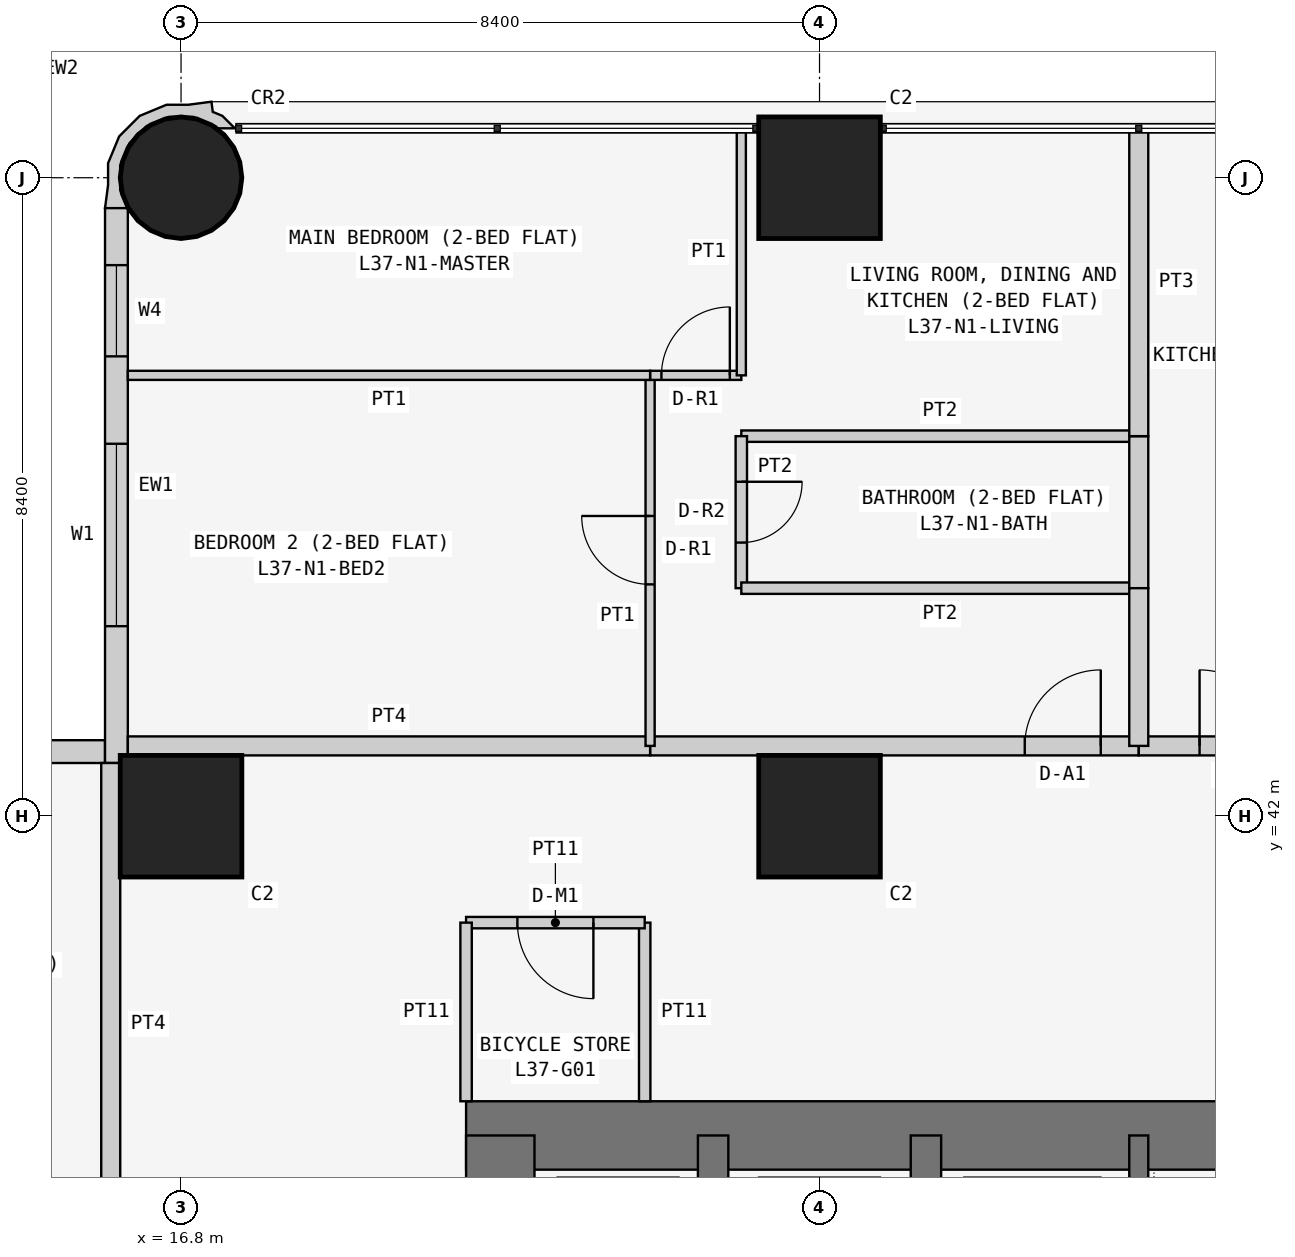
"""IFC4 building model, lengths in metres.
Left out: names, types, materials, properties, quantities, classifications, styles, units other than length and angle.
Written with IfcOpenShell. Run it as: python <this file> out.ifc"""

import sys

from ifc_helpers import new_model, si_unit, direction, frame, frame_2d, origin, origin_2d, place, context, subcontext, project, spatial, polyline, rectangle, circle, outline, extrude, element, fill, save


model = new_model("IFC4")
c1 = context("Model", 3, precision=1e-05, world=origin(), true_north=direction((0.0, 1.0)))
c2 = subcontext(c1, "Body", "Model", "MODEL_VIEW")
j1 = project(units=[si_unit("LENGTHUNIT", "METRE"), si_unit("PLANEANGLEUNIT", "RADIAN")], contexts=[c1])
p1 = place(None, origin())
s1 = spatial("IfcSite", under=j1, at=p1, CompositionType="ELEMENT")
p2 = place(p1, origin())
s2 = spatial("IfcBuilding", under=s1, at=p2, CompositionType="ELEMENT")
p3 = place(p2, frame((0.0, 0.0, 144.9)))
s3 = spatial("IfcBuildingStorey", under=s2, at=p3, CompositionType="ELEMENT", Elevation=144.9)
p4 = place(p3, frame((16.8, 42.0, 0.0), z_axis=(0.0, 0.0, 1.0), x_axis=(1.0, 0.0, 0.0)))
e1 = element("IfcColumn", 1, at=p4, inside=s3, PredefinedType="COLUMN", context=c2, shape_type="SweptSolid", body=[
    extrude(rectangle(XDim=1.6, YDim=1.6, at=origin_2d()), origin(), (0.0, 0.0, 1.0), 3.6),
])
p5 = place(p3, frame((16.8, 50.4, 0.0), z_axis=(0.0, 0.0, 1.0), x_axis=(1.0, 0.0, 0.0)))
e2 = element("IfcColumn", 2, at=p5, inside=s3, PredefinedType="COLUMN", context=c2, shape_type="SweptSolid", body=[
    extrude(circle(Radius=0.8, at=origin_2d()), origin(), (0.0, 0.0, 1.0), 3.6),
])
for number, where, z_axis, x_axis in (
    (3, (25.2, 42.0, 0.0), (0.0, 0.0, 1.0), (1.0, 0.0, 0.0)),
    (4, (25.2, 50.4, 0.0), (0.0, 0.0, 1.0), (1.0, 0.0, 0.0)),
):
    element("IfcColumn", number, at=place(p3, frame(where, z_axis=z_axis, x_axis=x_axis)), inside=s3, PredefinedType="COLUMN", context=c2, shape_type="SweptSolid", body=[
        extrude(rectangle(XDim=1.6, YDim=1.6, at=origin_2d()), origin(), (0.0, 0.0, 1.0), 3.6),
    ])
p6 = place(p3, frame((37.8, 37.8, 0.0), z_axis=(0.0, 0.0, 1.0), x_axis=(-1.0, 0.0, 0.0)))
e5 = element("IfcWall", 5, at=p6, inside=s3, PredefinedType="SHEAR", context=c2, shape_type="SweptSolid", body=[
    extrude(rectangle(XDim=17.25, YDim=0.9, at=frame_2d((8.625, 0.0))), origin(), (0.0, 0.0, 1.0), 3.6),
])
p7 = place(p3, frame((21.0, 37.8, 0.0), z_axis=(0.0, 0.0, 1.0), x_axis=(0.0, -1.0, 0.0)))
e6 = element("IfcWall", 6, at=p7, inside=s3, PredefinedType="SHEAR", context=c2, shape_type="SweptSolid", body=[
    extrude(rectangle(XDim=17.25, YDim=0.9, at=frame_2d((8.625, 0.0))), origin(), (0.0, 0.0, 1.0), 3.6),
])
p8 = place(p7, frame((5.4, 0.0, 0.0)))
e7 = element("IfcOpeningElement", 7, at=p8, cuts=e6, PredefinedType="OPENING", context=c2, shape_type="SweptSolid", body=[
    extrude(rectangle(XDim=1.2, YDim=2.1, at=frame_2d((0.6, 1.05))), frame((0.0, 0.46, 0.0), z_axis=(0.0, -1.0, 0.0), x_axis=(1.0, 0.0, 0.0)), (0.0, 0.0, 1.0), 0.92),
])
p9 = place(p3, frame((26.6, 21.0, 0.0), z_axis=(0.0, 0.0, 1.0), x_axis=(0.0, 1.0, 0.0)))
e8 = element("IfcWall", 8, at=p9, inside=s3, PredefinedType="SHEAR", context=c2, shape_type="SweptSolid", body=[
    extrude(rectangle(XDim=16.8, YDim=0.4, at=frame_2d((8.4, 0.0))), origin(), (0.0, 0.0, 1.0), 3.6),
])
p10 = place(p9, frame((10.4, 0.0, 0.0)))
e9 = element("IfcOpeningElement", 9, at=p10, cuts=e8, PredefinedType="OPENING", context=c2, shape_type="SweptSolid", body=[
    extrude(rectangle(XDim=1.2, YDim=2.1, at=frame_2d((0.6, 1.05))), frame((0.0, 0.21, 0.0), z_axis=(0.0, -1.0, 0.0), x_axis=(1.0, 0.0, 0.0)), (0.0, 0.0, 1.0), 0.42),
])
p11 = place(p3, frame((23.8, 34.6, 0.0), z_axis=(0.0, 0.0, 1.0), x_axis=(0.0, 1.0, 0.0)))
e10 = element("IfcWall", 10, at=p11, inside=s3, PredefinedType="SHEAR", context=c2, shape_type="SweptSolid", body=[
    extrude(rectangle(XDim=3.2, YDim=0.4, at=frame_2d((1.6, 0.0))), origin(), (0.0, 0.0, 1.0), 3.6),
])
p12 = place(p3, frame((29.4, 34.6, 0.0), z_axis=(0.0, 0.0, 1.0), x_axis=(0.0, 1.0, 0.0)))
e11 = element("IfcWall", 11, at=p12, inside=s3, PredefinedType="SHEAR", context=c2, shape_type="SweptSolid", body=[
    extrude(rectangle(XDim=3.2, YDim=0.25, at=frame_2d((1.6, 0.0))), origin(), (0.0, 0.0, 1.0), 3.6),
])
p13 = place(p3, frame((15.8, 42.85, 0.0), z_axis=(0.0, 0.0, 1.0), x_axis=(-1.0, 0.0, 0.0)))
e12 = element("IfcWall", 12, at=p13, inside=s3, PredefinedType="SOLIDWALL", context=c2, shape_type="SweptSolid", body=[
    extrude(rectangle(XDim=15.4, YDim=0.3, at=frame_2d((7.7, 0.0))), origin(), (0.0, 0.0, 1.0), 3.45),
])
p14 = place(p13, frame((1.2, 0.0, 0.9)))
e13 = element("IfcOpeningElement", 13, at=p14, cuts=e12, PredefinedType="OPENING", context=c2, shape_type="SweptSolid", body=[
    extrude(rectangle(XDim=1.8, YDim=1.5, at=frame_2d((0.9, 0.75))), frame((0.0, 0.16, 0.0), z_axis=(0.0, -1.0, 0.0), x_axis=(1.0, 0.0, 0.0)), (0.0, 0.0, 1.0), 0.32),
])
p15 = place(p13, frame((4.95, 0.0, 1.5)))
e14 = element("IfcOpeningElement", 14, at=p15, cuts=e12, PredefinedType="OPENING", context=c2, shape_type="SweptSolid", body=[
    extrude(rectangle(XDim=0.9, YDim=0.7, at=frame_2d((0.45, 0.35))), frame((0.0, 0.16, 0.0), z_axis=(0.0, -1.0, 0.0), x_axis=(1.0, 0.0, 0.0)), (0.0, 0.0, 1.0), 0.32),
])
p16 = place(p13, frame((8.5, 0.0, 0.9)))
e15 = element("IfcOpeningElement", 15, at=p16, cuts=e12, PredefinedType="OPENING", context=c2, shape_type="SweptSolid", body=[
    extrude(rectangle(XDim=1.8, YDim=1.5, at=frame_2d((0.9, 0.75))), frame((0.0, 0.16, 0.0), z_axis=(0.0, -1.0, 0.0), x_axis=(1.0, 0.0, 0.0)), (0.0, 0.0, 1.0), 0.32),
])
p17 = place(p13, frame((12.5, 0.0, 0.0)))
e16 = element("IfcOpeningElement", 16, at=p17, cuts=e12, PredefinedType="OPENING", context=c2, shape_type="SweptSolid", body=[
    extrude(rectangle(XDim=0.9, YDim=2.4, at=frame_2d((0.45, 1.2))), frame((0.0, 0.16, 0.0), z_axis=(0.0, -1.0, 0.0), x_axis=(1.0, 0.0, 0.0)), (0.0, 0.0, 1.0), 0.32),
])
p18 = place(p13, frame((13.5, 0.0, 0.9)))
e17 = element("IfcOpeningElement", 17, at=p18, cuts=e12, PredefinedType="OPENING", context=c2, shape_type="SweptSolid", body=[
    extrude(rectangle(XDim=1.2, YDim=1.5, at=frame_2d((0.6, 0.75))), frame((0.0, 0.16, 0.0), z_axis=(0.0, -1.0, 0.0), x_axis=(1.0, 0.0, 0.0)), (0.0, 0.0, 1.0), 0.32),
])
p19 = place(p3, frame((15.95, 50.0, 0.0), z_axis=(0.0, 0.0, 1.0), x_axis=(0.0, -1.0, 0.0)))
e18 = element("IfcWall", 18, at=p19, inside=s3, PredefinedType="SOLIDWALL", context=c2, shape_type="SweptSolid", body=[
    extrude(rectangle(XDim=7.3, YDim=0.3, at=frame_2d((3.65, 0.0))), origin(), (0.0, 0.0, 1.0), 3.45),
])
p20 = place(p19, frame((3.1, 0.0, 0.9)))
e19 = element("IfcOpeningElement", 19, at=p20, cuts=e18, PredefinedType="OPENING", context=c2, shape_type="SweptSolid", body=[
    extrude(rectangle(XDim=2.4, YDim=1.5, at=frame_2d((1.2, 0.75))), frame((0.0, 0.16, 0.0), z_axis=(0.0, -1.0, 0.0), x_axis=(1.0, 0.0, 0.0)), (0.0, 0.0, 1.0), 0.32),
])
p21 = place(p19, frame((0.75, 0.0, 0.9)))
e20 = element("IfcOpeningElement", 20, at=p21, cuts=e18, PredefinedType="OPENING", context=c2, shape_type="SweptSolid", body=[
    extrude(rectangle(XDim=1.2, YDim=1.5, at=frame_2d((0.6, 0.75))), frame((0.0, 0.16, 0.0), z_axis=(0.0, -1.0, 0.0), x_axis=(1.0, 0.0, 0.0)), (0.0, 0.0, 1.0), 0.32),
])
p22 = place(p3, frame((17.448, 50.995, 0.0), z_axis=(0.0, 0.0, 1.0), x_axis=(-0.343276641956, 0.93923434088, 0.0)))
e21 = element("IfcWall", 21, at=p22, inside=s3, PredefinedType="SOLIDWALL", context=c2, shape_type="SweptSolid", body=[
    extrude(outline(polyline([(0.241, 0.023), (0.333, 0.124), (0.465, 0.094), (0.532, 0.393), (0.631, 0.663), (0.614, 1.045), (0.454, 1.391), (0.172, 1.649), (-0.098, 1.748), (-0.369, 1.89), (-0.509, 1.621), (-0.491, 1.615), (-0.479, 1.609), (-0.211, 1.62), (0.088, 1.511), (0.323, 1.295), (0.457, 1.006), (0.47, 0.688), (0.361, 0.389), (0.145, 0.154), (0.108, 0.137), (0.031, -0.075), (0.241, 0.023)])), origin(), (0.0, 0.0, 1.0), 3.45),
])
p23 = place(p3, frame((22.9, 38.25, 0.0), z_axis=(0.0, 0.0, 1.0), x_axis=(0.0, 1.0, 0.0)))
e22 = element("IfcWall", 22, at=p23, inside=s3, PredefinedType="PARTITIONING", context=c2, shape_type="SweptSolid", body=[
    extrude(rectangle(XDim=2.35, YDim=0.15, at=frame_2d((1.175, 0.0))), origin(), (0.0, 0.0, 1.0), 3.45),
])
p24 = place(p3, frame((22.9, 40.6, 0.0), z_axis=(0.0, 0.0, 1.0), x_axis=(-1.0, 0.0, 0.0)))
e23 = element("IfcWall", 23, at=p24, inside=s3, PredefinedType="PARTITIONING", context=c2, shape_type="SweptSolid", body=[
    extrude(rectangle(XDim=2.35, YDim=0.15, at=frame_2d((1.175, 0.0))), origin(), (0.0, 0.0, 1.0), 3.45),
])
p25 = place(p24, frame((0.675, 0.0, 0.0)))
e24 = element("IfcOpeningElement", 24, at=p25, cuts=e23, PredefinedType="OPENING", context=c2, shape_type="SweptSolid", body=[
    extrude(rectangle(XDim=1.0, YDim=2.1, at=frame_2d((0.5, 1.05))), frame((0.0, 0.085, 0.0), z_axis=(0.0, -1.0, 0.0), x_axis=(1.0, 0.0, 0.0)), (0.0, 0.0, 1.0), 0.17),
])
p26 = place(p3, frame((20.55, 40.6, 0.0), z_axis=(0.0, 0.0, 1.0), x_axis=(0.0, -1.0, 0.0)))
e25 = element("IfcWall", 25, at=p26, inside=s3, PredefinedType="PARTITIONING", context=c2, shape_type="SweptSolid", body=[
    extrude(rectangle(XDim=2.35, YDim=0.15, at=frame_2d((1.175, 0.0))), origin(), (0.0, 0.0, 1.0), 3.45),
])
p27 = place(p3, frame((22.971, 42.925, 0.0), z_axis=(0.0, 0.0, 1.0), x_axis=(1.0, 0.0, 0.0)))
e26 = element("IfcWall", 26, at=p27, inside=s3, PredefinedType="PARTITIONING", context=c2, shape_type="SweptSolid", body=[
    extrude(rectangle(XDim=6.429, YDim=0.25, at=frame_2d((3.214, 0.0))), origin(), (0.0, 0.0, 1.0), 3.45),
])
p28 = place(p27, frame((4.929, 0.0, 0.0)))
e27 = element("IfcOpeningElement", 27, at=p28, cuts=e26, PredefinedType="OPENING", context=c2, shape_type="SweptSolid", body=[
    extrude(rectangle(XDim=1.0, YDim=2.1, at=frame_2d((0.5, 1.05))), frame((0.0, 0.135, 0.0), z_axis=(0.0, -1.0, 0.0), x_axis=(1.0, 0.0, 0.0)), (0.0, 0.0, 1.0), 0.27),
])
p29 = place(p3, frame((16.1, 42.925, 0.0), z_axis=(0.0, 0.0, 1.0), x_axis=(1.0, 0.0, 0.0)))
e28 = element("IfcWall", 28, at=p29, inside=s3, PredefinedType="PARTITIONING", context=c2, shape_type="SweptSolid", body=[
    extrude(rectangle(XDim=6.871, YDim=0.25, at=frame_2d((3.436, 0.0))), origin(), (0.0, 0.0, 1.0), 3.45),
])
p30 = place(p3, frame((29.4, 42.925, 0.0), z_axis=(0.0, 0.0, 1.0), x_axis=(1.0, 0.0, 0.0)))
e29 = element("IfcWall", 29, at=p30, inside=s3, PredefinedType="PARTITIONING", context=c2, shape_type="SweptSolid", body=[
    extrude(rectangle(XDim=2.6, YDim=0.25, at=frame_2d((1.3, 0.0))), origin(), (0.0, 0.0, 1.0), 3.45),
])
p31 = place(p30, frame((0.8, 0.0, 0.0)))
e30 = element("IfcOpeningElement", 30, at=p31, cuts=e29, PredefinedType="OPENING", context=c2, shape_type="SweptSolid", body=[
    extrude(rectangle(XDim=1.0, YDim=2.1, at=frame_2d((0.5, 1.05))), frame((0.0, 0.135, 0.0), z_axis=(0.0, -1.0, 0.0), x_axis=(1.0, 0.0, 0.0)), (0.0, 0.0, 1.0), 0.27),
])
p32 = place(p3, frame((15.875, 35.829, 0.0), z_axis=(0.0, 0.0, 1.0), x_axis=(0.0, 1.0, 0.0)))
e31 = element("IfcWall", 31, at=p32, inside=s3, PredefinedType="PARTITIONING", context=c2, shape_type="SweptSolid", body=[
    extrude(rectangle(XDim=6.871, YDim=0.25, at=frame_2d((3.436, 0.0))), origin(), (0.0, 0.0, 1.0), 3.45),
])
p33 = place(p3, frame((29.4, 47.0, 0.0), z_axis=(0.0, 0.0, 1.0), x_axis=(-1.0, 0.0, 0.0)))
e32 = element("IfcWall", 32, at=p33, inside=s3, PredefinedType="PARTITIONING", context=c2, shape_type="SweptSolid", body=[
    extrude(rectangle(XDim=5.229, YDim=0.15, at=frame_2d((2.615, 0.0))), origin(), (0.0, 0.0, 1.0), 3.45),
])
p34 = place(p3, frame((24.171, 47.0, 0.0), z_axis=(0.0, 0.0, 1.0), x_axis=(0.0, -1.0, 0.0)))
e33 = element("IfcWall", 33, at=p34, inside=s3, PredefinedType="PARTITIONING", context=c2, shape_type="SweptSolid", body=[
    extrude(rectangle(XDim=2.0, YDim=0.15, at=frame_2d((1.0, 0.0))), origin(), (0.0, 0.0, 1.0), 3.45),
])
p35 = place(p34, frame((0.6, 0.0, 0.0)))
e34 = element("IfcOpeningElement", 34, at=p35, cuts=e33, PredefinedType="OPENING", context=c2, shape_type="SweptSolid", body=[
    extrude(rectangle(XDim=0.8, YDim=2.1, at=frame_2d((0.4, 1.05))), frame((0.0, 0.085, 0.0), z_axis=(0.0, -1.0, 0.0), x_axis=(1.0, 0.0, 0.0)), (0.0, 0.0, 1.0), 0.17),
])
p36 = place(p3, frame((24.171, 45.0, 0.0), z_axis=(0.0, 0.0, 1.0), x_axis=(1.0, 0.0, 0.0)))
e35 = element("IfcWall", 35, at=p36, inside=s3, PredefinedType="PARTITIONING", context=c2, shape_type="SweptSolid", body=[
    extrude(rectangle(XDim=5.229, YDim=0.15, at=frame_2d((2.615, 0.0))), origin(), (0.0, 0.0, 1.0), 3.45),
])
p37 = place(p3, frame((29.4, 45.0, 0.0), z_axis=(0.0, 0.0, 1.0), x_axis=(0.0, 1.0, 0.0)))
e36 = element("IfcWall", 36, at=p37, inside=s3, PredefinedType="PARTITIONING", context=c2, shape_type="SweptSolid", body=[
    extrude(rectangle(XDim=2.0, YDim=0.25, at=frame_2d((1.0, 0.0))), origin(), (0.0, 0.0, 1.0), 2.848),
])
p38 = place(p3, frame((22.971, 42.925, 0.0), z_axis=(0.0, 0.0, 1.0), x_axis=(0.0, 1.0, 0.0)))
e37 = element("IfcWall", 37, at=p38, inside=s3, PredefinedType="PARTITIONING", context=c2, shape_type="SweptSolid", body=[
    extrude(rectangle(XDim=4.875, YDim=0.12, at=frame_2d((2.438, 0.0))), origin(), (0.0, 0.0, 1.0), 3.45),
])
p39 = place(p38, frame((2.125, 0.0, 0.0)))
e38 = element("IfcOpeningElement", 38, at=p39, cuts=e37, PredefinedType="OPENING", context=c2, shape_type="SweptSolid", body=[
    extrude(rectangle(XDim=0.9, YDim=2.1, at=frame_2d((0.45, 1.05))), frame((0.0, 0.07, 0.0), z_axis=(0.0, -1.0, 0.0), x_axis=(1.0, 0.0, 0.0)), (0.0, 0.0, 1.0), 0.14),
])
p40 = place(p3, frame((22.971, 47.8, 0.0), z_axis=(0.0, 0.0, 1.0), x_axis=(1.0, 0.0, 0.0)))
e39 = element("IfcWall", 39, at=p40, inside=s3, PredefinedType="PARTITIONING", context=c2, shape_type="SweptSolid", body=[
    extrude(rectangle(XDim=1.2, YDim=0.12, at=frame_2d((0.6, 0.0))), origin(), (0.0, 0.0, 1.0), 3.45),
])
p41 = place(p40, frame((0.149, 0.0, 0.0)))
e40 = element("IfcOpeningElement", 40, at=p41, cuts=e39, PredefinedType="OPENING", context=c2, shape_type="SweptSolid", body=[
    extrude(rectangle(XDim=0.9, YDim=2.1, at=frame_2d((0.45, 1.05))), frame((0.0, 0.07, 0.0), z_axis=(0.0, -1.0, 0.0), x_axis=(1.0, 0.0, 0.0)), (0.0, 0.0, 1.0), 0.14),
])
p42 = place(p3, frame((24.171, 47.8, 0.0), z_axis=(0.0, 0.0, 1.0), x_axis=(0.0, 1.0, 0.0)))
e41 = element("IfcWall", 41, at=p42, inside=s3, PredefinedType="PARTITIONING", context=c2, shape_type="SweptSolid", body=[
    extrude(rectangle(XDim=3.25, YDim=0.12, at=frame_2d((1.625, 0.0))), origin(), (0.0, 0.0, 1.0), 3.45),
])
p43 = place(p3, frame((29.4, 45.0, 0.0), z_axis=(0.0, 0.0, 1.0), x_axis=(0.0, -1.0, 0.0)))
e42 = element("IfcWall", 42, at=p43, inside=s3, PredefinedType="PARTITIONING", context=c2, shape_type="SweptSolid", body=[
    extrude(rectangle(XDim=2.075, YDim=0.25, at=frame_2d((1.038, 0.0))), origin(), (0.0, 0.0, 1.0), 2.848),
])
p44 = place(p3, frame((29.4, 51.05, 0.0), z_axis=(0.0, 0.0, 1.0), x_axis=(0.0, -1.0, 0.0)))
e43 = element("IfcWall", 43, at=p44, inside=s3, PredefinedType="PARTITIONING", context=c2, shape_type="SweptSolid", body=[
    extrude(rectangle(XDim=4.05, YDim=0.25, at=frame_2d((2.025, 0.0))), origin(), (0.0, 0.0, 1.0), 2.848),
])
p45 = place(p3, frame((22.971, 47.8, 0.0), z_axis=(0.0, 0.0, 1.0), x_axis=(-1.0, 0.0, 0.0)))
e44 = element("IfcWall", 44, at=p45, inside=s3, PredefinedType="PARTITIONING", context=c2, shape_type="SweptSolid", body=[
    extrude(rectangle(XDim=6.871, YDim=0.12, at=frame_2d((3.436, 0.0))), origin(), (0.0, 0.0, 1.0), 3.45),
])
p46 = place(p20, origin())
e45 = element("IfcWindow", 45, at=p46, inside=s3, PartitioningType="SINGLE_PANEL", PredefinedType="WINDOW", context=c2, shape_type="SweptSolid", body=[
    extrude(rectangle(XDim=2.4, YDim=1.5, at=frame_2d((1.2, 0.75))), frame((0.0, 0.03, 0.0), z_axis=(0.0, -1.0, 0.0), x_axis=(1.0, 0.0, 0.0)), (0.0, 0.0, 1.0), 0.06),
])
fill(e19, e45)
p47 = place(p21, origin())
e46 = element("IfcWindow", 46, at=p47, inside=s3, PartitioningType="SINGLE_PANEL", PredefinedType="WINDOW", context=c2, shape_type="SweptSolid", body=[
    extrude(rectangle(XDim=1.2, YDim=1.5, at=frame_2d((0.6, 0.75))), frame((0.0, 0.03, 0.0), z_axis=(0.0, -1.0, 0.0), x_axis=(1.0, 0.0, 0.0)), (0.0, 0.0, 1.0), 0.06),
])
fill(e20, e46)
p48 = place(p25, origin())
e47 = element("IfcDoor", 47, at=p48, inside=s3, OperationType="SINGLE_SWING_LEFT", PredefinedType="DOOR", context=c2, shape_type="SweptSolid", body=[
    extrude(rectangle(XDim=1.0, YDim=2.1, at=frame_2d((0.5, 1.05))), frame((0.0, 0.025, 0.0), z_axis=(0.0, -1.0, 0.0), x_axis=(1.0, 0.0, 0.0)), (0.0, 0.0, 1.0), 0.05),
])
fill(e24, e47)
p49 = place(p28, origin())
e48 = element("IfcDoor", 48, at=p49, inside=s3, OperationType="SINGLE_SWING_RIGHT", PredefinedType="DOOR", context=c2, shape_type="SweptSolid", body=[
    extrude(rectangle(XDim=1.0, YDim=2.1, at=frame_2d((0.5, 1.05))), frame((0.0, 0.025, 0.0), z_axis=(0.0, -1.0, 0.0), x_axis=(1.0, 0.0, 0.0)), (0.0, 0.0, 1.0), 0.05),
])
fill(e27, e48)
p50 = place(p35, origin())
e49 = element("IfcDoor", 49, at=p50, inside=s3, OperationType="SINGLE_SWING_LEFT", PredefinedType="DOOR", context=c2, shape_type="SweptSolid", body=[
    extrude(rectangle(XDim=0.8, YDim=2.1, at=frame_2d((0.4, 1.05))), frame((0.0, 0.025, 0.0), z_axis=(0.0, -1.0, 0.0), x_axis=(1.0, 0.0, 0.0)), (0.0, 0.0, 1.0), 0.05),
])
fill(e34, e49)
p51 = place(p39, origin())
e50 = element("IfcDoor", 50, at=p51, inside=s3, OperationType="SINGLE_SWING_RIGHT", PredefinedType="DOOR", context=c2, shape_type="SweptSolid", body=[
    extrude(rectangle(XDim=0.9, YDim=2.1, at=frame_2d((0.45, 1.05))), frame((0.0, 0.025, 0.0), z_axis=(0.0, -1.0, 0.0), x_axis=(1.0, 0.0, 0.0)), (0.0, 0.0, 1.0), 0.05),
])
fill(e38, e50)
p52 = place(p41, origin())
e51 = element("IfcDoor", 51, at=p52, inside=s3, OperationType="SINGLE_SWING_RIGHT", PredefinedType="DOOR", context=c2, shape_type="SweptSolid", body=[
    extrude(rectangle(XDim=0.9, YDim=2.1, at=frame_2d((0.45, 1.05))), frame((0.0, 0.025, 0.0), z_axis=(0.0, -1.0, 0.0), x_axis=(1.0, 0.0, 0.0)), (0.0, 0.0, 1.0), 0.05),
])
fill(e40, e51)
p53 = place(p31, origin())
e52 = element("IfcDoor", 52, at=p53, inside=s3, OperationType="SINGLE_SWING_LEFT", PredefinedType="DOOR", context=c2, shape_type="SweptSolid", body=[
    extrude(rectangle(XDim=1.0, YDim=2.1, at=frame_2d((0.5, 1.05))), frame((0.0, 0.025, 0.0), z_axis=(0.0, -1.0, 0.0), x_axis=(1.0, 0.0, 0.0)), (0.0, 0.0, 1.0), 0.05),
])
fill(e30, e52)
save(model, sys.argv[1])
